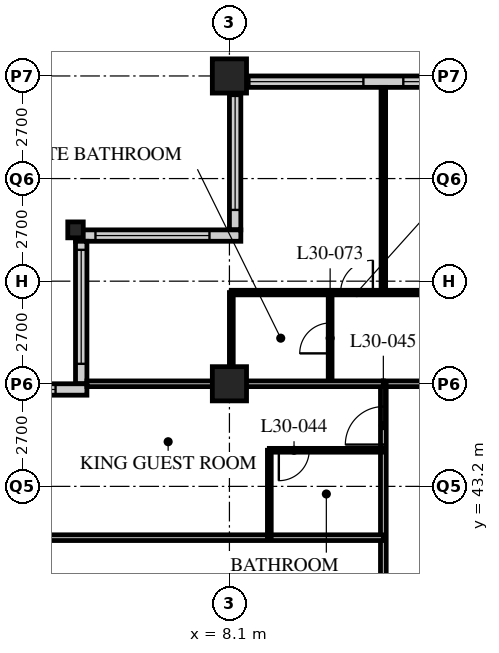
"""IFC4 building model, lengths in metres.
Left out: names, types, materials, properties, quantities, classifications, styles, units other than length and angle.
Written with IfcOpenShell. Run it as: python <this file> out.ifc"""

import sys

from ifc_helpers import new_model, si_unit, direction, frame, frame_2d, origin, origin_2d, place, context, subcontext, project, spatial, rectangle, hollow_rectangle, i_section, extrude, element, fill, save


model = new_model("IFC4")
c1 = context("Model", 3, precision=1e-05, world=origin(), true_north=direction((0.0, 1.0)))
c2 = subcontext(c1, "Body", "Model", "MODEL_VIEW")
j1 = project(units=[si_unit("LENGTHUNIT", "METRE"), si_unit("PLANEANGLEUNIT", "RADIAN")], contexts=[c1])
p1 = place(None, origin())
s1 = spatial("IfcSite", under=j1, at=p1, CompositionType="ELEMENT")
p2 = place(p1, origin())
s2 = spatial("IfcBuilding", under=s1, at=p2, CompositionType="ELEMENT")
p3 = place(p2, frame((0.0, 0.0, 120.4)))
s3 = spatial("IfcBuildingStorey", under=s2, at=p3, CompositionType="ELEMENT", Elevation=120.4)
p4 = place(p3, frame((4.05, 49.95, 0.0), z_axis=(0.0, 0.0, 1.0), x_axis=(1.0, 0.0, 0.0)))
e1 = element("IfcColumn", 1, at=p4, inside=s3, PredefinedType="COLUMN", context=c2, shape_type="SweptSolid", body=[
    extrude(i_section(OverallWidth=0.407, OverallDepth=0.419, WebThickness=0.031, FlangeThickness=0.049, FilletRadius=0.015, at=origin_2d()), origin(), (0.0, 0.0, 1.0), 3.4),
])
for number, where, z_axis, x_axis in (
    (2, (8.1, 45.9, 0.0), (0.0, 0.0, 1.0), (1.0, 0.0, 0.0)),
    (3, (8.1, 54.0, 0.0), (0.0, 0.0, 1.0), (1.0, 0.0, 0.0)),
):
    element("IfcColumn", number, at=place(p3, frame(where, z_axis=z_axis, x_axis=x_axis)), inside=s3, PredefinedType="COLUMN", context=c2, shape_type="SweptSolid", body=[
        extrude(hollow_rectangle(XDim=0.9, YDim=0.9, WallThickness=0.09, at=origin_2d()), origin(), (0.0, 0.0, 1.0), 3.4),
    ])
p5 = place(p3, frame((48.3, 53.85, 0.0), z_axis=(0.0, 0.0, 1.0), x_axis=(-1.0, 0.0, 0.0)))
e4 = element("IfcWall", 4, at=p5, inside=s3, PredefinedType="SOLIDWALL", context=c2, shape_type="SweptSolid", body=[
    extrude(rectangle(XDim=40.2, YDim=0.3, at=frame_2d((20.1, 0.0))), origin(), (0.0, 0.0, 1.0), 3.19),
])
p6 = place(p5, frame((0.225, 0.0, 0.9)))
e5 = element("IfcOpeningElement", 5, at=p6, cuts=e4, PredefinedType="OPENING", context=c2, shape_type="SweptSolid", body=[
    extrude(rectangle(XDim=3.0, YDim=2.0, at=frame_2d((1.5, 1.0))), frame((0.0, 0.16, 0.0), z_axis=(0.0, -1.0, 0.0), x_axis=(1.0, 0.0, 0.0)), (0.0, 0.0, 1.0), 0.32),
])
p7 = place(p5, frame((4.275, 0.0, 0.9)))
e6 = element("IfcOpeningElement", 6, at=p7, cuts=e4, PredefinedType="OPENING", context=c2, shape_type="SweptSolid", body=[
    extrude(rectangle(XDim=3.0, YDim=2.0, at=frame_2d((1.5, 1.0))), frame((0.0, 0.16, 0.0), z_axis=(0.0, -1.0, 0.0), x_axis=(1.0, 0.0, 0.0)), (0.0, 0.0, 1.0), 0.32),
])
p8 = place(p5, frame((8.325, 0.0, 0.9)))
e7 = element("IfcOpeningElement", 7, at=p8, cuts=e4, PredefinedType="OPENING", context=c2, shape_type="SweptSolid", body=[
    extrude(rectangle(XDim=3.0, YDim=2.0, at=frame_2d((1.5, 1.0))), frame((0.0, 0.16, 0.0), z_axis=(0.0, -1.0, 0.0), x_axis=(1.0, 0.0, 0.0)), (0.0, 0.0, 1.0), 0.32),
])
p9 = place(p5, frame((12.375, 0.0, 0.9)))
e8 = element("IfcOpeningElement", 8, at=p9, cuts=e4, PredefinedType="OPENING", context=c2, shape_type="SweptSolid", body=[
    extrude(rectangle(XDim=3.0, YDim=2.0, at=frame_2d((1.5, 1.0))), frame((0.0, 0.16, 0.0), z_axis=(0.0, -1.0, 0.0), x_axis=(1.0, 0.0, 0.0)), (0.0, 0.0, 1.0), 0.32),
])
p10 = place(p5, frame((16.425, 0.0, 0.9)))
e9 = element("IfcOpeningElement", 9, at=p10, cuts=e4, PredefinedType="OPENING", context=c2, shape_type="SweptSolid", body=[
    extrude(rectangle(XDim=3.0, YDim=2.0, at=frame_2d((1.5, 1.0))), frame((0.0, 0.16, 0.0), z_axis=(0.0, -1.0, 0.0), x_axis=(1.0, 0.0, 0.0)), (0.0, 0.0, 1.0), 0.32),
])
p11 = place(p5, frame((20.475, 0.0, 0.9)))
e10 = element("IfcOpeningElement", 10, at=p11, cuts=e4, PredefinedType="OPENING", context=c2, shape_type="SweptSolid", body=[
    extrude(rectangle(XDim=3.0, YDim=2.0, at=frame_2d((1.5, 1.0))), frame((0.0, 0.16, 0.0), z_axis=(0.0, -1.0, 0.0), x_axis=(1.0, 0.0, 0.0)), (0.0, 0.0, 1.0), 0.32),
])
p12 = place(p5, frame((24.525, 0.0, 0.9)))
e11 = element("IfcOpeningElement", 11, at=p12, cuts=e4, PredefinedType="OPENING", context=c2, shape_type="SweptSolid", body=[
    extrude(rectangle(XDim=3.0, YDim=2.0, at=frame_2d((1.5, 1.0))), frame((0.0, 0.16, 0.0), z_axis=(0.0, -1.0, 0.0), x_axis=(1.0, 0.0, 0.0)), (0.0, 0.0, 1.0), 0.32),
])
p13 = place(p5, frame((28.575, 0.0, 0.9)))
e12 = element("IfcOpeningElement", 12, at=p13, cuts=e4, PredefinedType="OPENING", context=c2, shape_type="SweptSolid", body=[
    extrude(rectangle(XDim=3.0, YDim=2.0, at=frame_2d((1.5, 1.0))), frame((0.0, 0.16, 0.0), z_axis=(0.0, -1.0, 0.0), x_axis=(1.0, 0.0, 0.0)), (0.0, 0.0, 1.0), 0.32),
])
p14 = place(p5, frame((32.625, 0.0, 0.9)))
e13 = element("IfcOpeningElement", 13, at=p14, cuts=e4, PredefinedType="OPENING", context=c2, shape_type="SweptSolid", body=[
    extrude(rectangle(XDim=3.0, YDim=2.0, at=frame_2d((1.5, 1.0))), frame((0.0, 0.16, 0.0), z_axis=(0.0, -1.0, 0.0), x_axis=(1.0, 0.0, 0.0)), (0.0, 0.0, 1.0), 0.32),
])
p15 = place(p5, frame((36.675, 0.0, 0.9)))
e14 = element("IfcOpeningElement", 14, at=p15, cuts=e4, PredefinedType="OPENING", context=c2, shape_type="SweptSolid", body=[
    extrude(rectangle(XDim=3.0, YDim=2.0, at=frame_2d((1.5, 1.0))), frame((0.0, 0.16, 0.0), z_axis=(0.0, -1.0, 0.0), x_axis=(1.0, 0.0, 0.0)), (0.0, 0.0, 1.0), 0.32),
])
p16 = place(p3, frame((8.25, 53.7, 0.0), z_axis=(0.0, 0.0, 1.0), x_axis=(0.0, -1.0, 0.0)))
e15 = element("IfcWall", 15, at=p16, inside=s3, PredefinedType="SOLIDWALL", context=c2, shape_type="SweptSolid", body=[
    extrude(rectangle(XDim=3.75, YDim=0.3, at=frame_2d((1.875, 0.0))), origin(), (0.0, 0.0, 1.0), 3.19),
])
p17 = place(p16, frame((0.225, 0.0, 0.9)))
e16 = element("IfcOpeningElement", 16, at=p17, cuts=e15, PredefinedType="OPENING", context=c2, shape_type="SweptSolid", body=[
    extrude(rectangle(XDim=3.0, YDim=1.5, at=frame_2d((1.5, 0.75))), frame((0.0, 0.16, 0.0), z_axis=(0.0, -1.0, 0.0), x_axis=(1.0, 0.0, 0.0)), (0.0, 0.0, 1.0), 0.32),
])
p18 = place(p3, frame((8.4, 49.8, 0.0), z_axis=(0.0, 0.0, 1.0), x_axis=(-1.0, 0.0, 0.0)))
e17 = element("IfcWall", 17, at=p18, inside=s3, PredefinedType="SOLIDWALL", context=c2, shape_type="SweptSolid", body=[
    extrude(rectangle(XDim=4.35, YDim=0.3, at=frame_2d((2.175, 0.0))), origin(), (0.0, 0.0, 1.0), 3.19),
])
p19 = place(p18, frame((0.825, 0.0, 0.9)))
e18 = element("IfcOpeningElement", 18, at=p19, cuts=e17, PredefinedType="OPENING", context=c2, shape_type="SweptSolid", body=[
    extrude(rectangle(XDim=3.0, YDim=1.5, at=frame_2d((1.5, 0.75))), frame((0.0, 0.16, 0.0), z_axis=(0.0, -1.0, 0.0), x_axis=(1.0, 0.0, 0.0)), (0.0, 0.0, 1.0), 0.32),
])
p20 = place(p3, frame((4.2, 49.65, 0.0), z_axis=(0.0, 0.0, 1.0), x_axis=(0.0, -1.0, 0.0)))
e19 = element("IfcWall", 19, at=p20, inside=s3, PredefinedType="SOLIDWALL", context=c2, shape_type="SweptSolid", body=[
    extrude(rectangle(XDim=3.75, YDim=0.3, at=frame_2d((1.875, 0.0))), origin(), (0.0, 0.0, 1.0), 3.19),
])
p21 = place(p20, frame((0.225, 0.0, 0.9)))
e20 = element("IfcOpeningElement", 20, at=p21, cuts=e19, PredefinedType="OPENING", context=c2, shape_type="SweptSolid", body=[
    extrude(rectangle(XDim=3.0, YDim=1.5, at=frame_2d((1.5, 0.75))), frame((0.0, 0.16, 0.0), z_axis=(0.0, -1.0, 0.0), x_axis=(1.0, 0.0, 0.0)), (0.0, 0.0, 1.0), 0.32),
])
p22 = place(p3, frame((4.35, 45.75, 0.0), z_axis=(0.0, 0.0, 1.0), x_axis=(-1.0, 0.0, 0.0)))
e21 = element("IfcWall", 21, at=p22, inside=s3, PredefinedType="SOLIDWALL", context=c2, shape_type="SweptSolid", body=[
    extrude(rectangle(XDim=4.35, YDim=0.3, at=frame_2d((2.175, 0.0))), origin(), (0.0, 0.0, 1.0), 3.19),
])
p23 = place(p22, frame((0.825, 0.0, 0.9)))
e22 = element("IfcOpeningElement", 22, at=p23, cuts=e21, PredefinedType="OPENING", context=c2, shape_type="SweptSolid", body=[
    extrude(rectangle(XDim=3.0, YDim=1.5, at=frame_2d((1.5, 0.75))), frame((0.0, 0.16, 0.0), z_axis=(0.0, -1.0, 0.0), x_axis=(1.0, 0.0, 0.0)), (0.0, 0.0, 1.0), 0.32),
])
p24 = place(p3, frame((12.15, 45.9, 0.0), z_axis=(0.0, 0.0, 1.0), x_axis=(1.0, 0.0, 0.0)))
e23 = element("IfcWall", 23, at=p24, inside=s3, PredefinedType="PARTITIONING", context=c2, shape_type="SweptSolid", body=[
    extrude(rectangle(XDim=32.4, YDim=0.15, at=frame_2d((16.2, 0.0))), origin(), (0.0, 0.0, 1.0), 2.578),
])
p25 = place(p24, frame((5.95, 0.0, 0.0)))
e24 = element("IfcOpeningElement", 24, at=p25, cuts=e23, PredefinedType="OPENING", context=c2, shape_type="SweptSolid", body=[
    extrude(rectangle(XDim=1.0, YDim=2.1, at=frame_2d((0.5, 1.05))), frame((0.0, 0.085, 0.0), z_axis=(0.0, -1.0, 0.0), x_axis=(1.0, 0.0, 0.0)), (0.0, 0.0, 1.0), 0.17),
])
p26 = place(p24, frame((14.05, 0.0, 0.0)))
e25 = element("IfcOpeningElement", 25, at=p26, cuts=e23, PredefinedType="OPENING", context=c2, shape_type="SweptSolid", body=[
    extrude(rectangle(XDim=1.0, YDim=2.1, at=frame_2d((0.5, 1.05))), frame((0.0, 0.085, 0.0), z_axis=(0.0, -1.0, 0.0), x_axis=(1.0, 0.0, 0.0)), (0.0, 0.0, 1.0), 0.17),
])
p27 = place(p24, frame((25.7, 0.0, 0.0)))
e26 = element("IfcOpeningElement", 26, at=p27, cuts=e23, PredefinedType="OPENING", context=c2, shape_type="SweptSolid", body=[
    extrude(rectangle(XDim=1.0, YDim=2.1, at=frame_2d((0.5, 1.05))), frame((0.0, 0.085, 0.0), z_axis=(0.0, -1.0, 0.0), x_axis=(1.0, 0.0, 0.0)), (0.0, 0.0, 1.0), 0.17),
])
p28 = place(p24, frame((29.875, 0.0, 0.0)))
e27 = element("IfcOpeningElement", 27, at=p28, cuts=e23, PredefinedType="OPENING", context=c2, shape_type="SweptSolid", body=[
    extrude(rectangle(XDim=1.0, YDim=2.1, at=frame_2d((0.5, 1.05))), frame((0.0, 0.085, 0.0), z_axis=(0.0, -1.0, 0.0), x_axis=(1.0, 0.0, 0.0)), (0.0, 0.0, 1.0), 0.17),
])
p29 = place(p24, frame((1.525, 0.0, 0.0)))
e28 = element("IfcOpeningElement", 28, at=p29, cuts=e23, PredefinedType="OPENING", context=c2, shape_type="SweptSolid", body=[
    extrude(rectangle(XDim=1.0, YDim=2.1, at=frame_2d((0.5, 1.05))), frame((0.0, 0.085, 0.0), z_axis=(0.0, -1.0, 0.0), x_axis=(1.0, 0.0, 0.0)), (0.0, 0.0, 1.0), 0.17),
])
p30 = place(p3, frame((12.15, 17.55, 0.0), z_axis=(0.0, 0.0, 1.0), x_axis=(0.0, 1.0, 0.0)))
e29 = element("IfcWall", 29, at=p30, inside=s3, PredefinedType="PARTITIONING", context=c2, shape_type="SweptSolid", body=[
    extrude(rectangle(XDim=28.35, YDim=0.15, at=frame_2d((14.175, 0.0))), origin(), (0.0, 0.0, 1.0), 3.19),
])
p31 = place(p30, frame((5.45, 0.0, 0.0)))
e30 = element("IfcOpeningElement", 30, at=p31, cuts=e29, PredefinedType="OPENING", context=c2, shape_type="SweptSolid", body=[
    extrude(rectangle(XDim=1.0, YDim=2.1, at=frame_2d((0.5, 1.05))), frame((0.0, 0.085, 0.0), z_axis=(0.0, -1.0, 0.0), x_axis=(1.0, 0.0, 0.0)), (0.0, 0.0, 1.0), 0.17),
])
p32 = place(p30, frame((13.55, 0.0, 0.0)))
e31 = element("IfcOpeningElement", 31, at=p32, cuts=e29, PredefinedType="OPENING", context=c2, shape_type="SweptSolid", body=[
    extrude(rectangle(XDim=1.0, YDim=2.1, at=frame_2d((0.5, 1.05))), frame((0.0, 0.085, 0.0), z_axis=(0.0, -1.0, 0.0), x_axis=(1.0, 0.0, 0.0)), (0.0, 0.0, 1.0), 0.17),
])
p33 = place(p30, frame((21.65, 0.0, 0.0)))
e32 = element("IfcOpeningElement", 32, at=p33, cuts=e29, PredefinedType="OPENING", context=c2, shape_type="SweptSolid", body=[
    extrude(rectangle(XDim=1.0, YDim=2.1, at=frame_2d((0.5, 1.05))), frame((0.0, 0.085, 0.0), z_axis=(0.0, -1.0, 0.0), x_axis=(1.0, 0.0, 0.0)), (0.0, 0.0, 1.0), 0.17),
])
p34 = place(p30, frame((26.75, 0.0, 0.0)))
e33 = element("IfcOpeningElement", 33, at=p34, cuts=e29, PredefinedType="OPENING", context=c2, shape_type="SweptSolid", body=[
    extrude(rectangle(XDim=1.0, YDim=2.1, at=frame_2d((0.5, 1.05))), frame((0.0, 0.085, 0.0), z_axis=(0.0, -1.0, 0.0), x_axis=(1.0, 0.0, 0.0)), (0.0, 0.0, 1.0), 0.17),
])
p35 = place(p3, frame((12.15, 41.85, 0.0), z_axis=(0.0, 0.0, 1.0), x_axis=(-1.0, 0.0, 0.0)))
e34 = element("IfcWall", 34, at=p35, inside=s3, PredefinedType="PARTITIONING", context=c2, shape_type="SweptSolid", body=[
    extrude(rectangle(XDim=11.85, YDim=0.15, at=frame_2d((5.925, 0.0))), origin(), (0.0, 0.0, 1.0), 3.19),
])
p36 = place(p3, frame((9.15, 41.85, 0.0), z_axis=(0.0, 0.0, 1.0), x_axis=(0.0, 1.0, 0.0)))
e35 = element("IfcWall", 35, at=p36, inside=s3, PredefinedType="PARTITIONING", context=c2, shape_type="SweptSolid", body=[
    extrude(rectangle(XDim=2.3, YDim=0.1, at=frame_2d((1.15, 0.0))), origin(), (0.0, 0.0, 1.0), 3.19),
])
p37 = place(p3, frame((12.15, 44.15, 0.0), z_axis=(0.0, 0.0, 1.0), x_axis=(-1.0, 0.0, 0.0)))
e36 = element("IfcWall", 36, at=p37, inside=s3, PredefinedType="PARTITIONING", context=c2, shape_type="SweptSolid", body=[
    extrude(rectangle(XDim=3.0, YDim=0.1, at=frame_2d((1.5, 0.0))), origin(), (0.0, 0.0, 1.0), 3.19),
])
p38 = place(p37, frame((1.95, 0.0, 0.0)))
e37 = element("IfcOpeningElement", 37, at=p38, cuts=e36, PredefinedType="OPENING", context=c2, shape_type="SweptSolid", body=[
    extrude(rectangle(XDim=0.8, YDim=2.1, at=frame_2d((0.4, 1.05))), frame((0.0, 0.06, 0.0), z_axis=(0.0, -1.0, 0.0), x_axis=(1.0, 0.0, 0.0)), (0.0, 0.0, 1.0), 0.12),
])
p39 = place(p3, frame((10.75, 45.9, 0.0), z_axis=(0.0, 0.0, 1.0), x_axis=(0.0, 1.0, 0.0)))
e38 = element("IfcWall", 38, at=p39, inside=s3, PredefinedType="PARTITIONING", context=c2, shape_type="SweptSolid", body=[
    extrude(rectangle(XDim=2.4, YDim=0.1, at=frame_2d((1.2, 0.0))), origin(), (0.0, 0.0, 1.0), 3.19),
])
p40 = place(p39, frame((0.8, 0.0, 0.0)))
e39 = element("IfcOpeningElement", 39, at=p40, cuts=e38, PredefinedType="OPENING", context=c2, shape_type="SweptSolid", body=[
    extrude(rectangle(XDim=0.8, YDim=2.1, at=frame_2d((0.4, 1.05))), frame((0.0, 0.06, 0.0), z_axis=(0.0, -1.0, 0.0), x_axis=(1.0, 0.0, 0.0)), (0.0, 0.0, 1.0), 0.12),
])
p41 = place(p3, frame((8.15, 45.9, 0.0), z_axis=(0.0, 0.0, 1.0), x_axis=(0.0, 1.0, 0.0)))
e40 = element("IfcWall", 40, at=p41, inside=s3, PredefinedType="PARTITIONING", context=c2, shape_type="SweptSolid", body=[
    extrude(rectangle(XDim=2.4, YDim=0.1, at=frame_2d((1.2, 0.0))), origin(), (0.0, 0.0, 1.0), 2.578),
])
p42 = place(p3, frame((8.15, 48.3, 0.0), z_axis=(0.0, 0.0, 1.0), x_axis=(1.0, 0.0, 0.0)))
e41 = element("IfcWall", 41, at=p42, inside=s3, PredefinedType="PARTITIONING", context=c2, shape_type="SweptSolid", body=[
    extrude(rectangle(XDim=8.05, YDim=0.12, at=frame_2d((4.025, 0.0))), origin(), (0.0, 0.0, 1.0), 3.19),
])
p43 = place(p42, frame((6.725, 0.0, 0.0)))
e42 = element("IfcOpeningElement", 42, at=p43, cuts=e41, PredefinedType="OPENING", context=c2, shape_type="SweptSolid", body=[
    extrude(rectangle(XDim=0.85, YDim=2.1, at=frame_2d((0.425, 1.05))), frame((0.0, 0.07, 0.0), z_axis=(0.0, -1.0, 0.0), x_axis=(1.0, 0.0, 0.0)), (0.0, 0.0, 1.0), 0.14),
])
p44 = place(p42, frame((2.875, 0.0, 0.0)))
e43 = element("IfcOpeningElement", 43, at=p44, cuts=e41, PredefinedType="OPENING", context=c2, shape_type="SweptSolid", body=[
    extrude(rectangle(XDim=0.85, YDim=2.1, at=frame_2d((0.425, 1.05))), frame((0.0, 0.07, 0.0), z_axis=(0.0, -1.0, 0.0), x_axis=(1.0, 0.0, 0.0)), (0.0, 0.0, 1.0), 0.14),
])
p45 = place(p3, frame((12.15, 48.3, 0.0), z_axis=(0.0, 0.0, 1.0), x_axis=(0.0, 1.0, 0.0)))
e44 = element("IfcWall", 44, at=p45, inside=s3, PredefinedType="PARTITIONING", context=c2, shape_type="SweptSolid", body=[
    extrude(rectangle(XDim=5.4, YDim=0.12, at=frame_2d((2.7, 0.0))), origin(), (0.0, 0.0, 1.0), 3.19),
])
p46 = place(p3, frame((4.35, 45.9, 0.0), z_axis=(0.0, 0.0, 1.0), x_axis=(1.0, 0.0, 0.0)))
e45 = element("IfcWall", 45, at=p46, inside=s3, PredefinedType="PARTITIONING", context=c2, shape_type="SweptSolid", body=[
    extrude(rectangle(XDim=7.8, YDim=0.15, at=frame_2d((3.9, 0.0))), origin(), (0.0, 0.0, 1.0), 2.578),
])
p47 = place(p14, origin())
e46 = element("IfcWindow", 46, at=p47, inside=s3, PartitioningType="SINGLE_PANEL", PredefinedType="WINDOW", context=c2, shape_type="SweptSolid", body=[
    extrude(rectangle(XDim=3.0, YDim=2.0, at=frame_2d((1.5, 1.0))), frame((0.0, 0.03, 0.0), z_axis=(0.0, -1.0, 0.0), x_axis=(1.0, 0.0, 0.0)), (0.0, 0.0, 1.0), 0.06),
])
fill(e13, e46)
p48 = place(p15, origin())
e47 = element("IfcWindow", 47, at=p48, inside=s3, PartitioningType="SINGLE_PANEL", PredefinedType="WINDOW", context=c2, shape_type="SweptSolid", body=[
    extrude(rectangle(XDim=3.0, YDim=2.0, at=frame_2d((1.5, 1.0))), frame((0.0, 0.03, 0.0), z_axis=(0.0, -1.0, 0.0), x_axis=(1.0, 0.0, 0.0)), (0.0, 0.0, 1.0), 0.06),
])
fill(e14, e47)
p49 = place(p17, origin())
e48 = element("IfcWindow", 48, at=p49, inside=s3, PartitioningType="SINGLE_PANEL", PredefinedType="WINDOW", context=c2, shape_type="SweptSolid", body=[
    extrude(rectangle(XDim=3.0, YDim=1.5, at=frame_2d((1.5, 0.75))), frame((0.0, 0.03, 0.0), z_axis=(0.0, -1.0, 0.0), x_axis=(1.0, 0.0, 0.0)), (0.0, 0.0, 1.0), 0.06),
])
fill(e16, e48)
p50 = place(p19, origin())
e49 = element("IfcWindow", 49, at=p50, inside=s3, PartitioningType="SINGLE_PANEL", PredefinedType="WINDOW", context=c2, shape_type="SweptSolid", body=[
    extrude(rectangle(XDim=3.0, YDim=1.5, at=frame_2d((1.5, 0.75))), frame((0.0, 0.03, 0.0), z_axis=(0.0, -1.0, 0.0), x_axis=(1.0, 0.0, 0.0)), (0.0, 0.0, 1.0), 0.06),
])
fill(e18, e49)
p51 = place(p21, origin())
e50 = element("IfcWindow", 50, at=p51, inside=s3, PartitioningType="SINGLE_PANEL", PredefinedType="WINDOW", context=c2, shape_type="SweptSolid", body=[
    extrude(rectangle(XDim=3.0, YDim=1.5, at=frame_2d((1.5, 0.75))), frame((0.0, 0.03, 0.0), z_axis=(0.0, -1.0, 0.0), x_axis=(1.0, 0.0, 0.0)), (0.0, 0.0, 1.0), 0.06),
])
fill(e20, e50)
p52 = place(p23, origin())
e51 = element("IfcWindow", 51, at=p52, inside=s3, PartitioningType="SINGLE_PANEL", PredefinedType="WINDOW", context=c2, shape_type="SweptSolid", body=[
    extrude(rectangle(XDim=3.0, YDim=1.5, at=frame_2d((1.5, 0.75))), frame((0.0, 0.03, 0.0), z_axis=(0.0, -1.0, 0.0), x_axis=(1.0, 0.0, 0.0)), (0.0, 0.0, 1.0), 0.06),
])
fill(e22, e51)
p53 = place(p38, origin())
e52 = element("IfcDoor", 52, at=p53, inside=s3, OperationType="SINGLE_SWING_RIGHT", PredefinedType="DOOR", context=c2, shape_type="SweptSolid", body=[
    extrude(rectangle(XDim=0.8, YDim=2.1, at=frame_2d((0.4, 1.05))), frame((0.0, 0.025, 0.0), z_axis=(0.0, -1.0, 0.0), x_axis=(1.0, 0.0, 0.0)), (0.0, 0.0, 1.0), 0.05),
])
fill(e37, e52)
p54 = place(p34, origin())
e53 = element("IfcDoor", 53, at=p54, inside=s3, OperationType="SINGLE_SWING_LEFT", PredefinedType="DOOR", context=c2, shape_type="SweptSolid", body=[
    extrude(rectangle(XDim=1.0, YDim=2.1, at=frame_2d((0.5, 1.05))), frame((0.0, 0.025, 0.0), z_axis=(0.0, -1.0, 0.0), x_axis=(1.0, 0.0, 0.0)), (0.0, 0.0, 1.0), 0.05),
])
fill(e33, e53)
p55 = place(p40, origin())
e54 = element("IfcDoor", 54, at=p55, inside=s3, OperationType="SINGLE_SWING_LEFT", PredefinedType="DOOR", context=c2, shape_type="SweptSolid", body=[
    extrude(rectangle(XDim=0.8, YDim=2.1, at=frame_2d((0.4, 1.05))), frame((0.0, 0.025, 0.0), z_axis=(0.0, -1.0, 0.0), x_axis=(1.0, 0.0, 0.0)), (0.0, 0.0, 1.0), 0.05),
])
fill(e39, e54)
p56 = place(p44, origin())
e55 = element("IfcDoor", 55, at=p56, inside=s3, OperationType="SINGLE_SWING_RIGHT", PredefinedType="DOOR", context=c2, shape_type="SweptSolid", body=[
    extrude(rectangle(XDim=0.85, YDim=2.1, at=frame_2d((0.425, 1.05))), frame((0.0, 0.025, 0.0), z_axis=(0.0, -1.0, 0.0), x_axis=(1.0, 0.0, 0.0)), (0.0, 0.0, 1.0), 0.05),
])
fill(e43, e55)
save(model, sys.argv[1])
